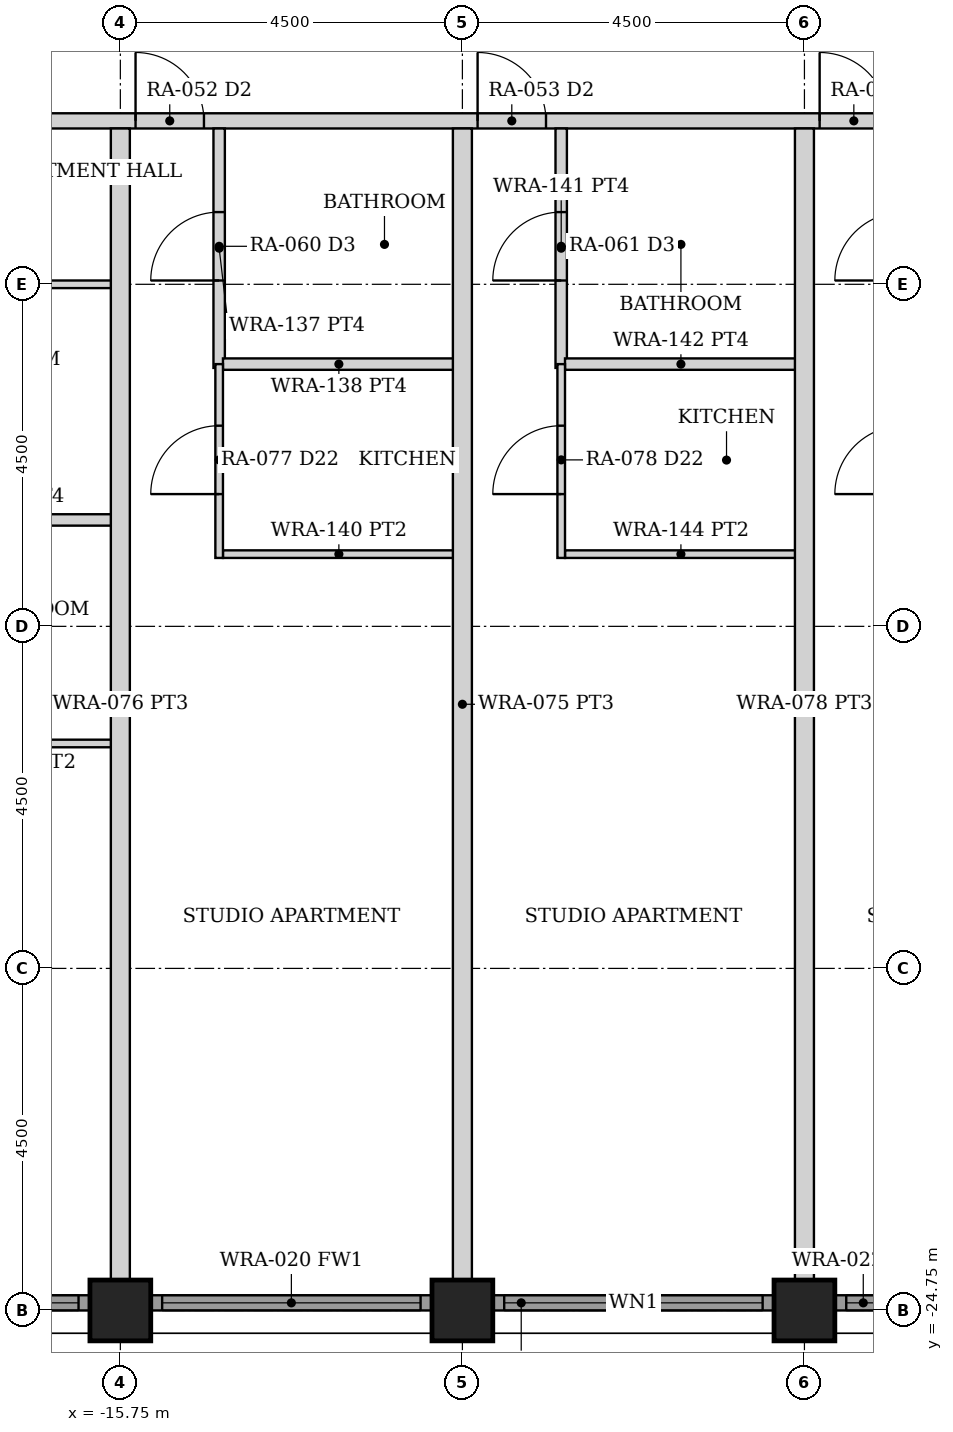
"""IFC4 building model, lengths in metres.
Left out: names, types, materials, properties, quantities, classifications, styles, units other than length and angle.
Written with IfcOpenShell. Run it as: python <this file> out.ifc"""

import sys

from ifc_helpers import new_model, si_unit, direction, frame, frame_2d, origin, origin_2d, place, context, subcontext, project, spatial, rectangle, hollow_rectangle, extrude, element, fill, save


model = new_model("IFC4")
c1 = context("Model", 3, precision=1e-05, world=origin(), true_north=direction((0.0, 1.0)))
c2 = subcontext(c1, "Body", "Model", "MODEL_VIEW")
j1 = project(units=[si_unit("LENGTHUNIT", "METRE"), si_unit("PLANEANGLEUNIT", "RADIAN")], contexts=[c1])
p1 = place(None, origin())
s1 = spatial("IfcSite", under=j1, at=p1, CompositionType="ELEMENT")
p2 = place(p1, origin())
s2 = spatial("IfcBuilding", under=s1, at=p2, CompositionType="ELEMENT")
p3 = place(p2, frame((0.0, 0.0, 30.0)))
s3 = spatial("IfcBuildingStorey", under=s2, at=p3, CompositionType="ELEMENT", Elevation=30.0)
for number, where, z_axis, x_axis in (
    (1, (-15.75, -24.75, 0.0), (0.0, 0.0, 1.0), (0.0, 1.0, 0.0)),
    (2, (-11.25, -24.75, 0.0), (0.0, 0.0, 1.0), (0.0, 1.0, 0.0)),
    (3, (-6.75, -24.75, 0.0), (0.0, 0.0, 1.0), (0.0, 1.0, 0.0)),
):
    element("IfcColumn", number, at=place(p3, frame(where, z_axis=z_axis, x_axis=x_axis)), inside=s3, PredefinedType="COLUMN", context=c2, shape_type="SweptSolid", body=[
        extrude(hollow_rectangle(XDim=0.8, YDim=0.8, WallThickness=0.08, at=origin_2d()), origin(), (0.0, 0.0, 1.0), 3.5),
    ])
p4 = place(p3, frame((-19.845, -24.65, 0.0), z_axis=(0.0, 0.0, 1.0), x_axis=(1.0, 0.0, 0.0)))
e4 = element("IfcWall", 4, at=p4, inside=s3, PredefinedType="SOLIDWALL", context=c2, shape_type="SweptSolid", body=[
    extrude(rectangle(XDim=3.69, YDim=0.2, at=frame_2d((1.845, 0.0))), origin(), (0.0, 0.0, 1.0), 2.379),
])
p5 = place(p4, frame((0.145, 0.0, 0.3)))
e5 = element("IfcOpeningElement", 5, at=p5, cuts=e4, PredefinedType="OPENING", context=c2, shape_type="SweptSolid", body=[
    extrude(rectangle(XDim=3.4, YDim=1.929, at=frame_2d((1.7, 0.964))), frame((0.0, 0.11, 0.0), z_axis=(0.0, -1.0, 0.0), x_axis=(1.0, 0.0, 0.0)), (0.0, 0.0, 1.0), 0.22),
])
p6 = place(p3, frame((-15.345, -24.65, 0.0), z_axis=(0.0, 0.0, 1.0), x_axis=(1.0, 0.0, 0.0)))
e6 = element("IfcWall", 6, at=p6, inside=s3, PredefinedType="SOLIDWALL", context=c2, shape_type="SweptSolid", body=[
    extrude(rectangle(XDim=3.69, YDim=0.2, at=frame_2d((1.845, 0.0))), origin(), (0.0, 0.0, 1.0), 2.379),
])
p7 = place(p6, frame((0.145, 0.0, 0.3)))
e7 = element("IfcOpeningElement", 7, at=p7, cuts=e6, PredefinedType="OPENING", context=c2, shape_type="SweptSolid", body=[
    extrude(rectangle(XDim=3.4, YDim=1.929, at=frame_2d((1.7, 0.964))), frame((0.0, 0.11, 0.0), z_axis=(0.0, -1.0, 0.0), x_axis=(1.0, 0.0, 0.0)), (0.0, 0.0, 1.0), 0.22),
])
p8 = place(p3, frame((-10.845, -24.65, 0.0), z_axis=(0.0, 0.0, 1.0), x_axis=(1.0, 0.0, 0.0)))
e8 = element("IfcWall", 8, at=p8, inside=s3, PredefinedType="SOLIDWALL", context=c2, shape_type="SweptSolid", body=[
    extrude(rectangle(XDim=3.69, YDim=0.2, at=frame_2d((1.845, 0.0))), origin(), (0.0, 0.0, 1.0), 2.379),
])
p9 = place(p8, frame((0.145, 0.0, 0.3)))
e9 = element("IfcOpeningElement", 9, at=p9, cuts=e8, PredefinedType="OPENING", context=c2, shape_type="SweptSolid", body=[
    extrude(rectangle(XDim=3.4, YDim=1.929, at=frame_2d((1.7, 0.964))), frame((0.0, 0.11, 0.0), z_axis=(0.0, -1.0, 0.0), x_axis=(1.0, 0.0, 0.0)), (0.0, 0.0, 1.0), 0.22),
])
p10 = place(p3, frame((-6.345, -24.65, 0.0), z_axis=(0.0, 0.0, 1.0), x_axis=(1.0, 0.0, 0.0)))
e10 = element("IfcWall", 10, at=p10, inside=s3, PredefinedType="SOLIDWALL", context=c2, shape_type="SweptSolid", body=[
    extrude(rectangle(XDim=3.69, YDim=0.2, at=frame_2d((1.845, 0.0))), origin(), (0.0, 0.0, 1.0), 2.379),
])
p11 = place(p10, frame((0.145, 0.0, 0.3)))
e11 = element("IfcOpeningElement", 11, at=p11, cuts=e10, PredefinedType="OPENING", context=c2, shape_type="SweptSolid", body=[
    extrude(rectangle(XDim=3.4, YDim=1.929, at=frame_2d((1.7, 0.964))), frame((0.0, 0.11, 0.0), z_axis=(0.0, -1.0, 0.0), x_axis=(1.0, 0.0, 0.0)), (0.0, 0.0, 1.0), 0.22),
])
p12 = place(p3, frame((-24.55, -9.1, 0.0), z_axis=(0.0, 0.0, 1.0), x_axis=(1.0, 0.0, 0.0)))
e12 = element("IfcWall", 12, at=p12, inside=s3, PredefinedType="PARTITIONING", context=c2, shape_type="SweptSolid", body=[
    extrude(rectangle(XDim=49.1, YDim=0.2, at=frame_2d((24.55, 0.0))), origin(), (0.0, 0.0, 1.0), 2.373),
])
p13 = place(p12, frame((5.1, 0.0, 0.0)))
e13 = element("IfcOpeningElement", 13, at=p13, cuts=e12, PredefinedType="OPENING", context=c2, shape_type="SweptSolid", body=[
    extrude(rectangle(XDim=0.9, YDim=2.1, at=frame_2d((0.45, 1.05))), frame((0.0, 0.11, 0.0), z_axis=(0.0, -1.0, 0.0), x_axis=(1.0, 0.0, 0.0)), (0.0, 0.0, 1.0), 0.22),
])
p14 = place(p12, frame((9.0, 0.0, 0.0)))
e14 = element("IfcOpeningElement", 14, at=p14, cuts=e12, PredefinedType="OPENING", context=c2, shape_type="SweptSolid", body=[
    extrude(rectangle(XDim=0.9, YDim=2.1, at=frame_2d((0.45, 1.05))), frame((0.0, 0.11, 0.0), z_axis=(0.0, -1.0, 0.0), x_axis=(1.0, 0.0, 0.0)), (0.0, 0.0, 1.0), 0.22),
])
p15 = place(p12, frame((13.5, 0.0, 0.0)))
e15 = element("IfcOpeningElement", 15, at=p15, cuts=e12, PredefinedType="OPENING", context=c2, shape_type="SweptSolid", body=[
    extrude(rectangle(XDim=0.9, YDim=2.1, at=frame_2d((0.45, 1.05))), frame((0.0, 0.11, 0.0), z_axis=(0.0, -1.0, 0.0), x_axis=(1.0, 0.0, 0.0)), (0.0, 0.0, 1.0), 0.22),
])
p16 = place(p12, frame((18.0, 0.0, 0.0)))
e16 = element("IfcOpeningElement", 16, at=p16, cuts=e12, PredefinedType="OPENING", context=c2, shape_type="SweptSolid", body=[
    extrude(rectangle(XDim=0.9, YDim=2.1, at=frame_2d((0.45, 1.05))), frame((0.0, 0.11, 0.0), z_axis=(0.0, -1.0, 0.0), x_axis=(1.0, 0.0, 0.0)), (0.0, 0.0, 1.0), 0.22),
])
p17 = place(p12, frame((22.5, 0.0, 0.0)))
e17 = element("IfcOpeningElement", 17, at=p17, cuts=e12, PredefinedType="OPENING", context=c2, shape_type="SweptSolid", body=[
    extrude(rectangle(XDim=0.9, YDim=2.1, at=frame_2d((0.45, 1.05))), frame((0.0, 0.11, 0.0), z_axis=(0.0, -1.0, 0.0), x_axis=(1.0, 0.0, 0.0)), (0.0, 0.0, 1.0), 0.22),
])
p18 = place(p12, frame((27.0, 0.0, 0.0)))
e18 = element("IfcOpeningElement", 18, at=p18, cuts=e12, PredefinedType="OPENING", context=c2, shape_type="SweptSolid", body=[
    extrude(rectangle(XDim=0.9, YDim=2.1, at=frame_2d((0.45, 1.05))), frame((0.0, 0.11, 0.0), z_axis=(0.0, -1.0, 0.0), x_axis=(1.0, 0.0, 0.0)), (0.0, 0.0, 1.0), 0.22),
])
p19 = place(p12, frame((31.5, 0.0, 0.0)))
e19 = element("IfcOpeningElement", 19, at=p19, cuts=e12, PredefinedType="OPENING", context=c2, shape_type="SweptSolid", body=[
    extrude(rectangle(XDim=0.9, YDim=2.1, at=frame_2d((0.45, 1.05))), frame((0.0, 0.11, 0.0), z_axis=(0.0, -1.0, 0.0), x_axis=(1.0, 0.0, 0.0)), (0.0, 0.0, 1.0), 0.22),
])
p20 = place(p12, frame((36.0, 0.0, 0.0)))
e20 = element("IfcOpeningElement", 20, at=p20, cuts=e12, PredefinedType="OPENING", context=c2, shape_type="SweptSolid", body=[
    extrude(rectangle(XDim=0.9, YDim=2.1, at=frame_2d((0.45, 1.05))), frame((0.0, 0.11, 0.0), z_axis=(0.0, -1.0, 0.0), x_axis=(1.0, 0.0, 0.0)), (0.0, 0.0, 1.0), 0.22),
])
p21 = place(p12, frame((43.1, 0.0, 0.0)))
e21 = element("IfcOpeningElement", 21, at=p21, cuts=e12, PredefinedType="OPENING", context=c2, shape_type="SweptSolid", body=[
    extrude(rectangle(XDim=0.9, YDim=2.1, at=frame_2d((0.45, 1.05))), frame((0.0, 0.11, 0.0), z_axis=(0.0, -1.0, 0.0), x_axis=(1.0, 0.0, 0.0)), (0.0, 0.0, 1.0), 0.22),
])
p22 = place(p3, frame((-24.35, -11.25, 0.0), z_axis=(0.0, 0.0, 1.0), x_axis=(1.0, 0.0, 0.0)))
e22 = element("IfcWall", 22, at=p22, inside=s3, PredefinedType="PARTITIONING", context=c2, shape_type="SweptSolid", body=[
    extrude(rectangle(XDim=8.5, YDim=0.1, at=frame_2d((4.25, 0.0))), origin(), (0.0, 0.0, 1.0), 2.373),
])
p23 = place(p22, frame((2.375, 0.0, 0.0)))
e23 = element("IfcOpeningElement", 23, at=p23, cuts=e22, PredefinedType="OPENING", context=c2, shape_type="SweptSolid", body=[
    extrude(rectangle(XDim=0.9, YDim=2.1, at=frame_2d((0.45, 1.05))), frame((0.0, 0.06, 0.0), z_axis=(0.0, -1.0, 0.0), x_axis=(1.0, 0.0, 0.0)), (0.0, 0.0, 1.0), 0.12),
])
p24 = place(p22, frame((0.35, 0.0, 0.0)))
e24 = element("IfcOpeningElement", 24, at=p24, cuts=e22, PredefinedType="OPENING", context=c2, shape_type="SweptSolid", body=[
    extrude(rectangle(XDim=0.9, YDim=2.1, at=frame_2d((0.45, 1.05))), frame((0.0, 0.06, 0.0), z_axis=(0.0, -1.0, 0.0), x_axis=(1.0, 0.0, 0.0)), (0.0, 0.0, 1.0), 0.12),
])
p25 = place(p22, frame((4.325, 0.0, 0.0)))
e25 = element("IfcOpeningElement", 25, at=p25, cuts=e22, PredefinedType="OPENING", context=c2, shape_type="SweptSolid", body=[
    extrude(rectangle(XDim=0.85, YDim=2.1, at=frame_2d((0.425, 1.05))), frame((0.0, 0.06, 0.0), z_axis=(0.0, -1.0, 0.0), x_axis=(1.0, 0.0, 0.0)), (0.0, 0.0, 1.0), 0.12),
])
p26 = place(p22, frame((6.52, 0.0, 0.0)))
e26 = element("IfcOpeningElement", 26, at=p26, cuts=e22, PredefinedType="OPENING", context=c2, shape_type="SweptSolid", body=[
    extrude(rectangle(XDim=0.9, YDim=2.1, at=frame_2d((0.45, 1.05))), frame((0.0, 0.06, 0.0), z_axis=(0.0, -1.0, 0.0), x_axis=(1.0, 0.0, 0.0)), (0.0, 0.0, 1.0), 0.12),
])
p27 = place(p3, frame((-18.95, -14.35, 0.0), z_axis=(0.0, 0.0, 1.0), x_axis=(1.0, 0.0, 0.0)))
e27 = element("IfcWall", 27, at=p27, inside=s3, PredefinedType="PARTITIONING", context=c2, shape_type="SweptSolid", body=[
    extrude(rectangle(XDim=3.14, YDim=0.15, at=frame_2d((1.57, 0.0))), origin(), (0.0, 0.0, 1.0), 2.373),
])
p28 = place(p3, frame((-18.95, -17.291, 0.0), z_axis=(0.0, 0.0, 1.0), x_axis=(1.0, 0.0, 0.0)))
e28 = element("IfcWall", 28, at=p28, inside=s3, PredefinedType="PARTITIONING", context=c2, shape_type="SweptSolid", body=[
    extrude(rectangle(XDim=3.14, YDim=0.1, at=frame_2d((1.57, 0.0))), origin(), (0.0, 0.0, 1.0), 2.373),
])
p29 = place(p3, frame((-14.45, -12.35, 0.0), z_axis=(0.0, 0.0, 1.0), x_axis=(0.0, 1.0, 0.0)))
e29 = element("IfcWall", 29, at=p29, inside=s3, PredefinedType="PARTITIONING", context=c2, shape_type="SweptSolid", body=[
    extrude(rectangle(XDim=3.15, YDim=0.15, at=frame_2d((1.575, 0.0))), origin(), (0.0, 0.0, 1.0), 2.373),
])
p30 = place(p29, frame((1.15, 0.0, 0.0)))
e30 = element("IfcOpeningElement", 30, at=p30, cuts=e29, PredefinedType="OPENING", context=c2, shape_type="SweptSolid", body=[
    extrude(rectangle(XDim=0.9, YDim=2.1, at=frame_2d((0.45, 1.05))), frame((0.0, 0.085, 0.0), z_axis=(0.0, -1.0, 0.0), x_axis=(1.0, 0.0, 0.0)), (0.0, 0.0, 1.0), 0.17),
])
p31 = place(p3, frame((-14.4, -12.3, 0.0), z_axis=(0.0, 0.0, 1.0), x_axis=(1.0, 0.0, 0.0)))
e31 = element("IfcWall", 31, at=p31, inside=s3, PredefinedType="PARTITIONING", context=c2, shape_type="SweptSolid", body=[
    extrude(rectangle(XDim=3.05, YDim=0.15, at=frame_2d((1.525, 0.0))), origin(), (0.0, 0.0, 1.0), 2.373),
])
p32 = place(p3, frame((-14.4, -14.8, 0.0), z_axis=(0.0, 0.0, 1.0), x_axis=(1.0, 0.0, 0.0)))
e32 = element("IfcWall", 32, at=p32, inside=s3, PredefinedType="PARTITIONING", context=c2, shape_type="SweptSolid", body=[
    extrude(rectangle(XDim=3.05, YDim=0.1, at=frame_2d((1.525, 0.0))), origin(), (0.0, 0.0, 1.0), 2.373),
])
p33 = place(p3, frame((-14.45, -14.85, 0.0), z_axis=(0.0, 0.0, 1.0), x_axis=(0.0, 1.0, 0.0)))
e33 = element("IfcWall", 33, at=p33, inside=s3, PredefinedType="PARTITIONING", context=c2, shape_type="SweptSolid", body=[
    extrude(rectangle(XDim=2.55, YDim=0.1, at=frame_2d((1.275, 0.0))), origin(), (0.0, 0.0, 1.0), 2.373),
])
p34 = place(p33, frame((0.84, 0.0, 0.0)))
e34 = element("IfcOpeningElement", 34, at=p34, cuts=e33, PredefinedType="OPENING", context=c2, shape_type="SweptSolid", body=[
    extrude(rectangle(XDim=0.9, YDim=2.1, at=frame_2d((0.45, 1.05))), frame((0.0, 0.06, 0.0), z_axis=(0.0, -1.0, 0.0), x_axis=(1.0, 0.0, 0.0)), (0.0, 0.0, 1.0), 0.12),
])
p35 = place(p3, frame((-9.95, -12.35, 0.0), z_axis=(0.0, 0.0, 1.0), x_axis=(0.0, 1.0, 0.0)))
e35 = element("IfcWall", 35, at=p35, inside=s3, PredefinedType="PARTITIONING", context=c2, shape_type="SweptSolid", body=[
    extrude(rectangle(XDim=3.15, YDim=0.15, at=frame_2d((1.575, 0.0))), origin(), (0.0, 0.0, 1.0), 2.373),
])
p36 = place(p35, frame((1.15, 0.0, 0.0)))
e36 = element("IfcOpeningElement", 36, at=p36, cuts=e35, PredefinedType="OPENING", context=c2, shape_type="SweptSolid", body=[
    extrude(rectangle(XDim=0.9, YDim=2.1, at=frame_2d((0.45, 1.05))), frame((0.0, 0.085, 0.0), z_axis=(0.0, -1.0, 0.0), x_axis=(1.0, 0.0, 0.0)), (0.0, 0.0, 1.0), 0.17),
])
p37 = place(p3, frame((-9.9, -12.3, 0.0), z_axis=(0.0, 0.0, 1.0), x_axis=(1.0, 0.0, 0.0)))
e37 = element("IfcWall", 37, at=p37, inside=s3, PredefinedType="PARTITIONING", context=c2, shape_type="SweptSolid", body=[
    extrude(rectangle(XDim=3.05, YDim=0.15, at=frame_2d((1.525, 0.0))), origin(), (0.0, 0.0, 1.0), 2.373),
])
p38 = place(p3, frame((-9.9, -14.8, 0.0), z_axis=(0.0, 0.0, 1.0), x_axis=(1.0, 0.0, 0.0)))
e38 = element("IfcWall", 38, at=p38, inside=s3, PredefinedType="PARTITIONING", context=c2, shape_type="SweptSolid", body=[
    extrude(rectangle(XDim=3.05, YDim=0.1, at=frame_2d((1.525, 0.0))), origin(), (0.0, 0.0, 1.0), 2.373),
])
p39 = place(p3, frame((-9.95, -14.85, 0.0), z_axis=(0.0, 0.0, 1.0), x_axis=(0.0, 1.0, 0.0)))
e39 = element("IfcWall", 39, at=p39, inside=s3, PredefinedType="PARTITIONING", context=c2, shape_type="SweptSolid", body=[
    extrude(rectangle(XDim=2.55, YDim=0.1, at=frame_2d((1.275, 0.0))), origin(), (0.0, 0.0, 1.0), 2.373),
])
p40 = place(p39, frame((0.84, 0.0, 0.0)))
e40 = element("IfcOpeningElement", 40, at=p40, cuts=e39, PredefinedType="OPENING", context=c2, shape_type="SweptSolid", body=[
    extrude(rectangle(XDim=0.9, YDim=2.1, at=frame_2d((0.45, 1.05))), frame((0.0, 0.06, 0.0), z_axis=(0.0, -1.0, 0.0), x_axis=(1.0, 0.0, 0.0)), (0.0, 0.0, 1.0), 0.12),
])
for number, where, z_axis, x_axis in (
    (41, (-15.75, -24.35, 0.0), (0.0, 0.0, 1.0), (0.0, 1.0, 0.0)),
    (42, (-11.25, -24.35, 0.0), (0.0, 0.0, 1.0), (0.0, 1.0, 0.0)),
    (43, (-6.75, -24.35, 0.0), (0.0, 0.0, 1.0), (0.0, 1.0, 0.0)),
):
    element("IfcWall", number, at=place(p3, frame(where, z_axis=z_axis, x_axis=x_axis)), inside=s3, PredefinedType="PARTITIONING", context=c2, shape_type="SweptSolid", body=[
        extrude(rectangle(XDim=15.15, YDim=0.25, at=frame_2d((7.575, 0.0))), origin(), (0.0, 0.0, 1.0), 2.373),
    ])
p41 = place(p5, origin())
e44 = element("IfcWindow", 44, at=p41, inside=s3, PartitioningType="SINGLE_PANEL", PredefinedType="WINDOW", context=c2, shape_type="SweptSolid", body=[
    extrude(rectangle(XDim=3.4, YDim=1.929, at=frame_2d((1.7, 0.964))), frame((0.0, 0.03, 0.0), z_axis=(0.0, -1.0, 0.0), x_axis=(1.0, 0.0, 0.0)), (0.0, 0.0, 1.0), 0.06),
])
fill(e5, e44)
p42 = place(p7, origin())
e45 = element("IfcWindow", 45, at=p42, inside=s3, PartitioningType="SINGLE_PANEL", PredefinedType="WINDOW", context=c2, shape_type="SweptSolid", body=[
    extrude(rectangle(XDim=3.4, YDim=1.929, at=frame_2d((1.7, 0.964))), frame((0.0, 0.03, 0.0), z_axis=(0.0, -1.0, 0.0), x_axis=(1.0, 0.0, 0.0)), (0.0, 0.0, 1.0), 0.06),
])
fill(e7, e45)
p43 = place(p9, origin())
e46 = element("IfcWindow", 46, at=p43, inside=s3, PartitioningType="SINGLE_PANEL", PredefinedType="WINDOW", context=c2, shape_type="SweptSolid", body=[
    extrude(rectangle(XDim=3.4, YDim=1.929, at=frame_2d((1.7, 0.964))), frame((0.0, 0.03, 0.0), z_axis=(0.0, -1.0, 0.0), x_axis=(1.0, 0.0, 0.0)), (0.0, 0.0, 1.0), 0.06),
])
fill(e9, e46)
p44 = place(p11, origin())
e47 = element("IfcWindow", 47, at=p44, inside=s3, PartitioningType="SINGLE_PANEL", PredefinedType="WINDOW", context=c2, shape_type="SweptSolid", body=[
    extrude(rectangle(XDim=3.4, YDim=1.929, at=frame_2d((1.7, 0.964))), frame((0.0, 0.03, 0.0), z_axis=(0.0, -1.0, 0.0), x_axis=(1.0, 0.0, 0.0)), (0.0, 0.0, 1.0), 0.06),
])
fill(e11, e47)
p45 = place(p14, origin())
e48 = element("IfcDoor", 48, at=p45, inside=s3, OperationType="SINGLE_SWING_LEFT", PredefinedType="DOOR", context=c2, shape_type="SweptSolid", body=[
    extrude(rectangle(XDim=0.9, YDim=2.1, at=frame_2d((0.45, 1.05))), frame((0.0, 0.025, 0.0), z_axis=(0.0, -1.0, 0.0), x_axis=(1.0, 0.0, 0.0)), (0.0, 0.0, 1.0), 0.05),
])
fill(e14, e48)
p46 = place(p30, origin())
e49 = element("IfcDoor", 49, at=p46, inside=s3, OperationType="SINGLE_SWING_LEFT", PredefinedType="DOOR", context=c2, shape_type="SweptSolid", body=[
    extrude(rectangle(XDim=0.9, YDim=2.1, at=frame_2d((0.45, 1.05))), frame((0.0, 0.025, 0.0), z_axis=(0.0, -1.0, 0.0), x_axis=(1.0, 0.0, 0.0)), (0.0, 0.0, 1.0), 0.05),
])
fill(e30, e49)
p47 = place(p34, origin())
e50 = element("IfcDoor", 50, at=p47, inside=s3, OperationType="SINGLE_SWING_LEFT", PredefinedType="DOOR", context=c2, shape_type="SweptSolid", body=[
    extrude(rectangle(XDim=0.9, YDim=2.1, at=frame_2d((0.45, 1.05))), frame((0.0, 0.025, 0.0), z_axis=(0.0, -1.0, 0.0), x_axis=(1.0, 0.0, 0.0)), (0.0, 0.0, 1.0), 0.05),
])
fill(e34, e50)
p48 = place(p15, origin())
e51 = element("IfcDoor", 51, at=p48, inside=s3, OperationType="SINGLE_SWING_LEFT", PredefinedType="DOOR", context=c2, shape_type="SweptSolid", body=[
    extrude(rectangle(XDim=0.9, YDim=2.1, at=frame_2d((0.45, 1.05))), frame((0.0, 0.025, 0.0), z_axis=(0.0, -1.0, 0.0), x_axis=(1.0, 0.0, 0.0)), (0.0, 0.0, 1.0), 0.05),
])
fill(e15, e51)
p49 = place(p36, origin())
e52 = element("IfcDoor", 52, at=p49, inside=s3, OperationType="SINGLE_SWING_LEFT", PredefinedType="DOOR", context=c2, shape_type="SweptSolid", body=[
    extrude(rectangle(XDim=0.9, YDim=2.1, at=frame_2d((0.45, 1.05))), frame((0.0, 0.025, 0.0), z_axis=(0.0, -1.0, 0.0), x_axis=(1.0, 0.0, 0.0)), (0.0, 0.0, 1.0), 0.05),
])
fill(e36, e52)
p50 = place(p40, origin())
e53 = element("IfcDoor", 53, at=p50, inside=s3, OperationType="SINGLE_SWING_LEFT", PredefinedType="DOOR", context=c2, shape_type="SweptSolid", body=[
    extrude(rectangle(XDim=0.9, YDim=2.1, at=frame_2d((0.45, 1.05))), frame((0.0, 0.025, 0.0), z_axis=(0.0, -1.0, 0.0), x_axis=(1.0, 0.0, 0.0)), (0.0, 0.0, 1.0), 0.05),
])
fill(e40, e53)
p51 = place(p16, origin())
e54 = element("IfcDoor", 54, at=p51, inside=s3, OperationType="SINGLE_SWING_LEFT", PredefinedType="DOOR", context=c2, shape_type="SweptSolid", body=[
    extrude(rectangle(XDim=0.9, YDim=2.1, at=frame_2d((0.45, 1.05))), frame((0.0, 0.025, 0.0), z_axis=(0.0, -1.0, 0.0), x_axis=(1.0, 0.0, 0.0)), (0.0, 0.0, 1.0), 0.05),
])
fill(e16, e54)
save(model, sys.argv[1])
